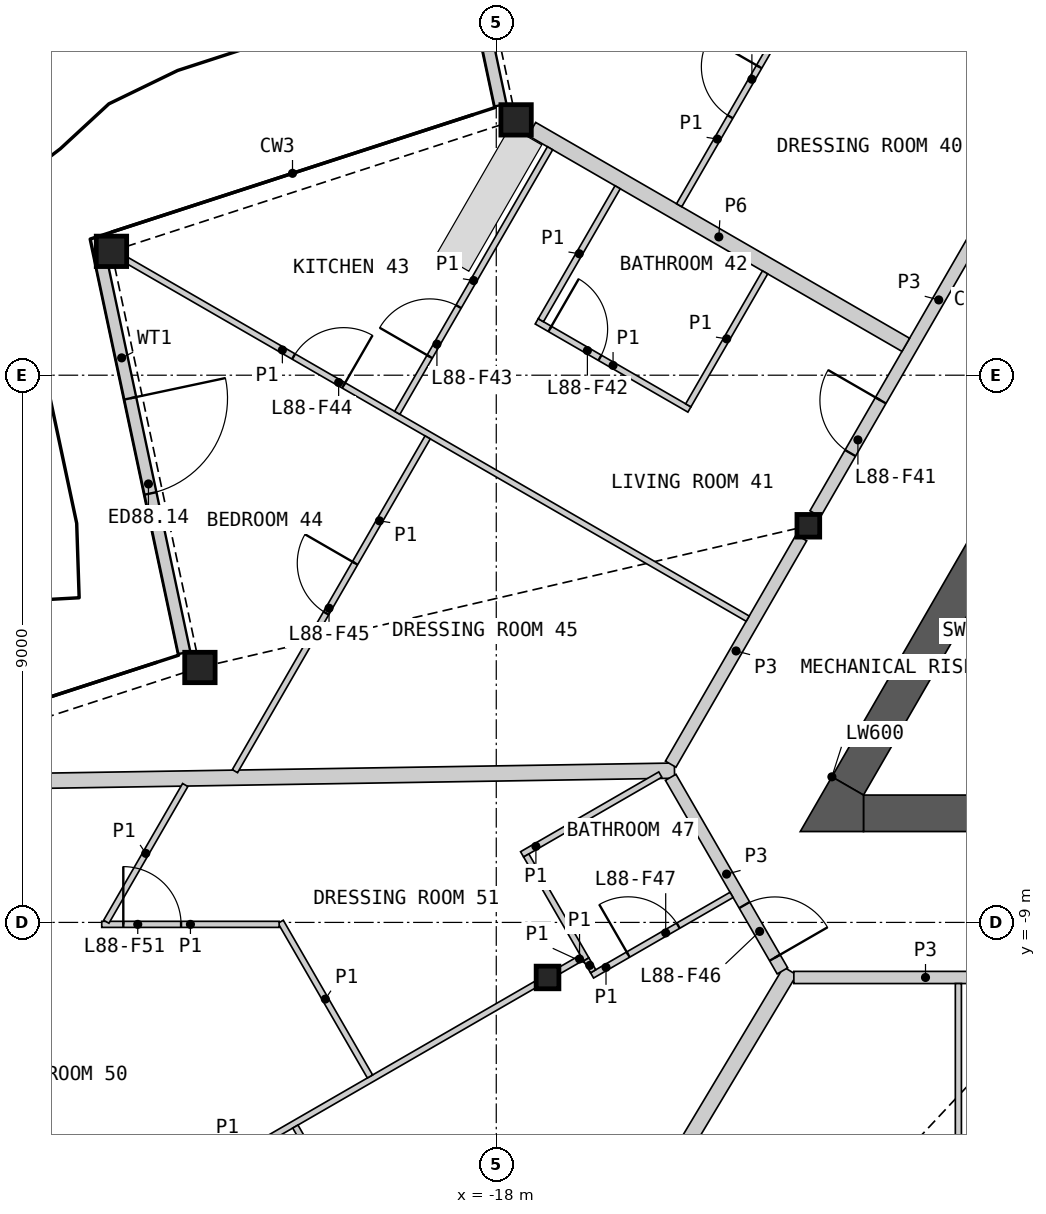
"""IFC4 building model, lengths in metres.
Left out: names, types, materials, properties, quantities, classifications, styles, units other than length and angle.
Written with IfcOpenShell. Run it as: python <this file> out.ifc"""

import sys

from ifc_helpers import new_model, si_unit, direction, frame, frame_2d, origin, origin_2d, place, context, subcontext, project, spatial, polyline, rectangle, hollow_rectangle, i_section, outline, extrude, element, fill, save


model = new_model("IFC4")
c1 = context("Model", 3, precision=1e-05, world=origin(), true_north=direction((0.0, 1.0)))
c2 = subcontext(c1, "Body", "Model", "MODEL_VIEW")
j1 = project(units=[si_unit("LENGTHUNIT", "METRE"), si_unit("PLANEANGLEUNIT", "RADIAN")], contexts=[c1])
p1 = place(None, origin())
s1 = spatial("IfcSite", under=j1, at=p1, CompositionType="ELEMENT")
p2 = place(p1, origin())
s2 = spatial("IfcBuilding", under=s1, at=p2, CompositionType="ELEMENT")
p3 = place(p2, frame((0.0, 0.0, 388.2)))
s3 = spatial("IfcBuildingStorey", under=s2, at=p3, CompositionType="ELEMENT", Elevation=388.2)
for number, where, z_axis, x_axis in (
    (1, (-17.674, 4.199, 0.0), (0.0, 0.0, 1.0), (1.0, 0.0, 0.0)),
    (2, (-24.329, 2.037, 0.0), (0.0, 0.0, 1.0), (1.0, 0.0, 0.0)),
    (3, (-22.874, -4.807, 0.0), (0.0, 0.0, 1.0), (1.0, 0.0, 0.0)),
):
    element("IfcColumn", number, at=place(p3, frame(where, z_axis=z_axis, x_axis=x_axis)), inside=s3, PredefinedType="COLUMN", context=c2, shape_type="SweptSolid", body=[
        extrude(hollow_rectangle(XDim=0.5, YDim=0.5, WallThickness=0.03, at=origin_2d()), origin(), (0.0, 0.0, 1.0), 3.4),
    ])
for number, where, z_axis, x_axis in (
    (4, (-12.868, -2.476, 0.0), (0.0, 0.0, 1.0), (1.0, 0.0, 0.0)),
    (5, (-17.157, -9.906, 0.0), (0.0, 0.0, 1.0), (1.0, 0.0, 0.0)),
):
    element("IfcColumn", number, at=place(p3, frame(where, z_axis=z_axis, x_axis=x_axis)), inside=s3, PredefinedType="COLUMN", context=c2, shape_type="SweptSolid", body=[
        extrude(i_section(OverallWidth=0.374, OverallDepth=0.372, WebThickness=0.016, FlangeThickness=0.026, at=origin_2d()), origin(), (0.0, 0.0, 1.0), 3.4),
    ])
p4 = place(p3, frame((-19.304, 10.909, 0.0), z_axis=(0.0, 0.0, 1.0), x_axis=(0.207882161022, -0.97815387702, 0.0)))
e6 = element("IfcWall", 6, at=p4, inside=s3, PredefinedType="SOLIDWALL", context=c2, shape_type="SweptSolid", body=[
    extrude(rectangle(XDim=6.612, YDim=0.2, at=frame_2d((3.306, 0.0))), origin(), (0.0, 0.0, 1.0), 2.634),
])
p5 = place(p4, frame((2.333, 0.0, 0.0)))
e7 = element("IfcOpeningElement", 7, at=p5, cuts=e6, PredefinedType="OPENING", context=c2, shape_type="SweptSolid", body=[
    extrude(rectangle(XDim=1.6, YDim=2.25, at=frame_2d((0.8, 1.125))), frame((0.0, 0.11, 0.0), z_axis=(0.0, -1.0, 0.0), x_axis=(1.0, 0.0, 0.0)), (0.0, 0.0, 1.0), 0.22),
])
p6 = place(p3, frame((-24.505, 1.902, 0.0), z_axis=(0.0, 0.0, 1.0), x_axis=(0.207917488951, -0.978146368285, 0.0)))
e8 = element("IfcWall", 8, at=p6, inside=s3, PredefinedType="SOLIDWALL", context=c2, shape_type="SweptSolid", body=[
    extrude(rectangle(XDim=6.612, YDim=0.2, at=frame_2d((3.306, 0.0))), origin(), (0.0, 0.0, 1.0), 2.634),
])
p7 = place(p6, frame((2.333, 0.0, 0.0)))
e9 = element("IfcOpeningElement", 9, at=p7, cuts=e8, PredefinedType="OPENING", context=c2, shape_type="SweptSolid", body=[
    extrude(rectangle(XDim=1.6, YDim=2.25, at=frame_2d((0.8, 1.125))), frame((0.0, 0.11, 0.0), z_axis=(0.0, -1.0, 0.0), x_axis=(1.0, 0.0, 0.0)), (0.0, 0.0, 1.0), 0.22),
])
p8 = place(p3, origin())
e10 = element("IfcWall", 10, at=p8, inside=s3, PredefinedType="SHEAR", context=c2, shape_type="SweptSolid", body=[
    extrude(outline(polyline([(-5.307, -1.281), (-10.374, -4.206), (-10.032, -4.298), (-5.182, -1.498), (-5.307, -1.281)])), origin(), (0.0, 0.0, 1.0), 3.1),
])
p9 = place(p3, origin())
e11 = element("IfcWall", 11, at=p9, inside=s3, PredefinedType="SHEAR", context=c2, shape_type="SweptSolid", body=[
    extrude(outline(polyline([(-10.374, -4.206), (-8.83, -6.881), (-8.738, -6.539), (-10.032, -4.298), (-10.374, -4.206)])), origin(), (0.0, 0.0, 1.0), 3.1),
])
p10 = place(p3, frame((-11.961, -7.206, 0.0), z_axis=(0.0, 0.0, 1.0), x_axis=(1.0, 0.0, 0.0)))
e12 = element("IfcWall", 12, at=p10, inside=s3, PredefinedType="SHEAR", context=c2, shape_type="SweptSolid", body=[
    extrude(rectangle(XDim=4.868, YDim=0.6, at=frame_2d((2.434, 0.0))), origin(), (0.0, 0.0, 1.0), 3.1),
])
p11 = place(p3, frame((-9.562, -2.15, 0.0), z_axis=(0.0, 0.0, 1.0), x_axis=(-0.500015214976, -0.866016619236, 0.0)))
e13 = element("IfcWall", 13, at=p11, inside=s3, PredefinedType="SHEAR", context=c2, shape_type="SweptSolid", body=[
    extrude(rectangle(XDim=5.318, YDim=0.6, at=frame_2d((2.659, 0.0))), origin(), (0.0, 0.0, 1.0), 3.1),
])
p12 = place(p3, origin())
e14 = element("IfcWall", 14, at=p12, inside=s3, PredefinedType="SHEAR", context=c2, shape_type="SweptSolid", body=[
    extrude(outline(polyline([(-12.48, -6.606), (-11.961, -6.906), (-11.961, -7.506), (-13.0, -7.506), (-12.48, -6.606)])), origin(), (0.0, 0.0, 1.0), 3.1),
])
p13 = place(p3, frame((-20.338, -21.771, 0.0), z_axis=(0.0, 0.0, 1.0), x_axis=(0.513878217441, 0.857863146218, 0.0)))
e15 = element("IfcWall", 15, at=p13, inside=s3, PredefinedType="PARTITIONING", context=c2, shape_type="SweptSolid", body=[
    extrude(rectangle(XDim=13.956, YDim=0.25, at=frame_2d((6.978, 0.0))), origin(), (0.0, 0.0, 1.0), 2.33),
])
p14 = place(p3, frame((-29.269, -6.732, 0.0), z_axis=(0.0, 0.0, 1.0), x_axis=(0.999870533117, 0.016090898164, 0.0)))
e16 = element("IfcWall", 16, at=p14, inside=s3, PredefinedType="PARTITIONING", context=c2, shape_type="SweptSolid", body=[
    extrude(rectangle(XDim=14.202, YDim=0.25, at=frame_2d((7.101, 0.0))), origin(), (0.0, 0.0, 1.0), 2.33),
])
p15 = place(p3, frame((-12.754, -2.279, 0.0), z_axis=(0.0, 0.0, 1.0), x_axis=(0.500001682468, 0.866024432409, 0.0)))
e17 = element("IfcWall", 17, at=p15, inside=s3, PredefinedType="PARTITIONING", context=c2, shape_type="SweptSolid", body=[
    extrude(rectangle(XDim=8.124, YDim=0.2, at=frame_2d((4.062, 0.0))), origin(), (0.0, 0.0, 1.0), 3.1),
])
p16 = place(p15, frame((1.153, 0.0, 0.0)))
e18 = element("IfcOpeningElement", 18, at=p16, cuts=e17, PredefinedType="OPENING", context=c2, shape_type="SweptSolid", body=[
    extrude(rectangle(XDim=1.0, YDim=2.1, at=frame_2d((0.5, 1.05))), frame((0.0, 0.11, 0.0), z_axis=(0.0, -1.0, 0.0), x_axis=(1.0, 0.0, 0.0)), (0.0, 0.0, 1.0), 0.22),
])
p17 = place(p3, frame((-17.414, 4.049, 0.0), z_axis=(0.0, 0.0, 1.0), x_axis=(0.866033839264, -0.499985389037, 0.0)))
e19 = element("IfcWall", 19, at=p17, inside=s3, PredefinedType="PARTITIONING", context=c2, shape_type="SweptSolid", body=[
    extrude(rectangle(XDim=7.1, YDim=0.25, at=frame_2d((3.55, 0.0))), origin(), (0.0, 0.0, 1.0), 2.33),
])
p18 = place(p3, frame((-13.106, -9.906, 0.0), z_axis=(0.0, 0.0, 1.0), x_axis=(1.0, 0.0, 0.0)))
e20 = element("IfcWall", 20, at=p18, inside=s3, PredefinedType="PARTITIONING", context=c2, shape_type="SweptSolid", body=[
    extrude(rectangle(XDim=4.331, YDim=0.2, at=frame_2d((2.165, 0.0))), origin(), (0.0, 0.0, 1.0), 3.1),
])
p19 = place(p3, frame((-15.131, -6.397, 0.0), z_axis=(0.0, 0.0, 1.0), x_axis=(0.499986217557, 0.866033360935, 0.0)))
e21 = element("IfcWall", 21, at=p19, inside=s3, PredefinedType="PARTITIONING", context=c2, shape_type="SweptSolid", body=[
    extrude(rectangle(XDim=4.3, YDim=0.2, at=frame_2d((2.15, 0.0))), origin(), (0.0, 0.0, 1.0), 3.1),
])
p20 = place(p3, frame((-15.131, -6.614, 0.0), z_axis=(0.0, 0.0, 1.0), x_axis=(0.499967746641, -0.866044024469, 0.0)))
e22 = element("IfcWall", 22, at=p20, inside=s3, PredefinedType="PARTITIONING", context=c2, shape_type="SweptSolid", body=[
    extrude(rectangle(XDim=3.676, YDim=0.2, at=frame_2d((1.838, 0.0))), origin(), (0.0, 0.0, 1.0), 3.1),
])
p21 = place(p20, frame((2.426, 0.0, 0.0)))
e23 = element("IfcOpeningElement", 23, at=p21, cuts=e22, PredefinedType="OPENING", context=c2, shape_type="SweptSolid", body=[
    extrude(rectangle(XDim=1.0, YDim=2.1, at=frame_2d((0.5, 1.05))), frame((0.0, 0.11, 0.0), z_axis=(0.0, -1.0, 0.0), x_axis=(1.0, 0.0, 0.0)), (0.0, 0.0, 1.0), 0.22),
])
p22 = place(p3, frame((-10.4, -21.828, 0.0), z_axis=(0.0, 0.0, 1.0), x_axis=(0.0, 1.0, 0.0)))
e24 = element("IfcWall", 24, at=p22, inside=s3, PredefinedType="PARTITIONING", context=c2, shape_type="SweptSolid", body=[
    extrude(rectangle(XDim=11.822, YDim=0.1, at=frame_2d((5.911, 0.0))), origin(), (0.0, 0.0, 1.0), 2.33),
])
p23 = place(p22, frame((1.156, 0.0, 0.0)))
e25 = element("IfcOpeningElement", 25, at=p23, cuts=e24, PredefinedType="OPENING", context=c2, shape_type="SweptSolid", body=[
    extrude(rectangle(XDim=0.95, YDim=2.1, at=frame_2d((0.475, 1.05))), frame((0.0, 0.06, 0.0), z_axis=(0.0, -1.0, 0.0), x_axis=(1.0, 0.0, 0.0)), (0.0, 0.0, 1.0), 0.12),
])
p24 = place(p3, frame((-24.069, 1.887, 0.0), z_axis=(0.0, 0.0, 1.0), x_axis=(0.866023404247, -0.500003463284, 0.0)))
e26 = element("IfcWall", 26, at=p24, inside=s3, PredefinedType="PARTITIONING", context=c2, shape_type="SweptSolid", body=[
    extrude(rectangle(XDim=11.782, YDim=0.1, at=frame_2d((5.891, 0.0))), origin(), (0.0, 0.0, 1.0), 2.33),
])
p25 = place(p24, frame((3.159, 0.0, 0.0)))
e27 = element("IfcOpeningElement", 27, at=p25, cuts=e26, PredefinedType="OPENING", context=c2, shape_type="SweptSolid", body=[
    extrude(rectangle(XDim=0.95, YDim=2.1, at=frame_2d((0.475, 1.05))), frame((0.0, 0.06, 0.0), z_axis=(0.0, -1.0, 0.0), x_axis=(1.0, 0.0, 0.0)), (0.0, 0.0, 1.0), 0.12),
])
p26 = place(p3, frame((-18.869, 10.894, 0.0), z_axis=(0.0, 0.0, 1.0), x_axis=(0.866023724155, -0.500002909193, 0.0)))
e28 = element("IfcWall", 28, at=p26, inside=s3, PredefinedType="PARTITIONING", context=c2, shape_type="SweptSolid", body=[
    extrude(rectangle(XDim=11.655, YDim=0.1, at=frame_2d((5.827, 0.0))), origin(), (0.0, 0.0, 1.0), 2.33),
])
p27 = place(p26, frame((6.253, 0.0, 0.0)))
e29 = element("IfcOpeningElement", 29, at=p27, cuts=e28, PredefinedType="OPENING", context=c2, shape_type="SweptSolid", body=[
    extrude(rectangle(XDim=0.95, YDim=2.1, at=frame_2d((0.475, 1.05))), frame((0.0, 0.06, 0.0), z_axis=(0.0, -1.0, 0.0), x_axis=(1.0, 0.0, 0.0)), (0.0, 0.0, 1.0), 0.12),
])
p28 = place(p3, frame((-26.777, -15.46, 0.0), z_axis=(0.0, 0.0, 1.0), x_axis=(0.866019680922, 0.500009912158, 0.0)))
e30 = element("IfcWall", 30, at=p28, inside=s3, PredefinedType="PARTITIONING", context=c2, shape_type="SweptSolid", body=[
    extrude(rectangle(XDim=10.881, YDim=0.1, at=frame_2d((5.44, 0.0))), origin(), (0.0, 0.0, 1.0), 2.33),
])
p29 = place(p28, frame((1.454, 0.0, 0.0)))
e31 = element("IfcOpeningElement", 31, at=p29, cuts=e30, PredefinedType="OPENING", context=c2, shape_type="SweptSolid", body=[
    extrude(rectangle(XDim=0.95, YDim=2.1, at=frame_2d((0.475, 1.05))), frame((0.0, 0.06, 0.0), z_axis=(0.0, -1.0, 0.0), x_axis=(1.0, 0.0, 0.0)), (0.0, 0.0, 1.0), 0.12),
])
p30 = place(p3, frame((-21.304, -12.358, 0.0), z_axis=(0.0, 0.0, 1.0), x_axis=(0.500000558108, -0.866025081561, 0.0)))
e32 = element("IfcWall", 32, at=p30, inside=s3, PredefinedType="PARTITIONING", context=c2, shape_type="SweptSolid", body=[
    extrude(rectangle(XDim=6.358, YDim=0.1, at=frame_2d((3.179, 0.0))), origin(), (0.0, 0.0, 1.0), 2.33),
])
p31 = place(p30, frame((3.555, 0.0, 0.0)))
e33 = element("IfcOpeningElement", 33, at=p31, cuts=e32, PredefinedType="OPENING", context=c2, shape_type="SweptSolid", body=[
    extrude(rectangle(XDim=0.95, YDim=2.1, at=frame_2d((0.475, 1.05))), frame((0.0, 0.06, 0.0), z_axis=(0.0, -1.0, 0.0), x_axis=(1.0, 0.0, 0.0)), (0.0, 0.0, 1.0), 0.12),
])
p32 = place(p3, frame((-22.298, -6.512, 0.0), z_axis=(0.0, 0.0, 1.0), x_axis=(0.499991387631, 0.866030376081, 0.0)))
e34 = element("IfcWall", 34, at=p32, inside=s3, PredefinedType="PARTITIONING", context=c2, shape_type="SweptSolid", body=[
    extrude(rectangle(XDim=6.339, YDim=0.1, at=frame_2d((3.169, 0.0))), origin(), (0.0, 0.0, 1.0), 2.33),
])
p33 = place(p32, frame((3.0, 0.0, 0.0)))
e35 = element("IfcOpeningElement", 35, at=p33, cuts=e34, PredefinedType="OPENING", context=c2, shape_type="SweptSolid", body=[
    extrude(rectangle(XDim=0.95, YDim=2.1, at=frame_2d((0.475, 1.05))), frame((0.0, 0.06, 0.0), z_axis=(0.0, -1.0, 0.0), x_axis=(1.0, 0.0, 0.0)), (0.0, 0.0, 1.0), 0.12),
])
p34 = place(p3, frame((-19.628, -0.619, 0.0), z_axis=(0.0, 0.0, 1.0), x_axis=(0.499990214365, 0.86603105345, 0.0)))
e36 = element("IfcWall", 36, at=p34, inside=s3, PredefinedType="PARTITIONING", context=c2, shape_type="SweptSolid", body=[
    extrude(rectangle(XDim=5.025, YDim=0.1, at=frame_2d((2.512, 0.0))), origin(), (0.0, 0.0, 1.0), 2.33),
])
p35 = place(p34, frame((1.067, 0.0, 0.0)))
e37 = element("IfcOpeningElement", 37, at=p35, cuts=e36, PredefinedType="OPENING", context=c2, shape_type="SweptSolid", body=[
    extrude(rectangle(XDim=0.95, YDim=2.1, at=frame_2d((0.475, 1.05))), frame((0.0, 0.06, 0.0), z_axis=(0.0, -1.0, 0.0), x_axis=(1.0, 0.0, 0.0)), (0.0, 0.0, 1.0), 0.12),
])
p36 = place(p3, frame((-14.992, 2.796, 0.0), z_axis=(0.0, 0.0, 1.0), x_axis=(0.499990214365, 0.86603105345, 0.0)))
e38 = element("IfcWall", 38, at=p36, inside=s3, PredefinedType="PARTITIONING", context=c2, shape_type="SweptSolid", body=[
    extrude(rectangle(XDim=5.025, YDim=0.1, at=frame_2d((2.512, 0.0))), origin(), (0.0, 0.0, 1.0), 2.33),
])
p37 = place(p36, frame((1.68, 0.0, 0.0)))
e39 = element("IfcOpeningElement", 39, at=p37, cuts=e38, PredefinedType="OPENING", context=c2, shape_type="SweptSolid", body=[
    extrude(rectangle(XDim=0.95, YDim=2.1, at=frame_2d((0.475, 1.05))), frame((0.0, 0.06, 0.0), z_axis=(0.0, -1.0, 0.0), x_axis=(1.0, 0.0, 0.0)), (0.0, 0.0, 1.0), 0.12),
])
p38 = place(p3, frame((-21.546, -8.989, 0.0), z_axis=(0.0, 0.0, 1.0), x_axis=(0.499919039967, -0.866072141036, 0.0)))
e40 = element("IfcWall", 40, at=p38, inside=s3, PredefinedType="PARTITIONING", context=c2, shape_type="SweptSolid", body=[
    extrude(rectangle(XDim=2.938, YDim=0.1, at=frame_2d((1.469, 0.0))), origin(), (0.0, 0.0, 1.0), 2.33),
])
p39 = place(p3, frame((-24.489, -9.032, 0.0), z_axis=(0.0, 0.0, 1.0), x_axis=(1.0, 0.0, 0.0)))
e41 = element("IfcWall", 41, at=p39, inside=s3, PredefinedType="PARTITIONING", context=c2, shape_type="SweptSolid", body=[
    extrude(rectangle(XDim=2.917, YDim=0.1, at=frame_2d((1.459, 0.0))), origin(), (0.0, 0.0, 1.0), 2.33),
])
p40 = place(p39, frame((0.355, 0.0, 0.0)))
e42 = element("IfcOpeningElement", 42, at=p40, cuts=e41, PredefinedType="OPENING", context=c2, shape_type="SweptSolid", body=[
    extrude(rectangle(XDim=0.95, YDim=2.1, at=frame_2d((0.475, 1.05))), frame((0.0, 0.06, 0.0), z_axis=(0.0, -1.0, 0.0), x_axis=(1.0, 0.0, 0.0)), (0.0, 0.0, 1.0), 0.12),
])
p41 = place(p3, frame((-17.335, 0.886, 0.0), z_axis=(0.0, 0.0, 1.0), x_axis=(0.866032775405, -0.499987231761, 0.0)))
e43 = element("IfcWall", 43, at=p41, inside=s3, PredefinedType="PARTITIONING", context=c2, shape_type="SweptSolid", body=[
    extrude(rectangle(XDim=2.9, YDim=0.1, at=frame_2d((1.45, 0.0))), origin(), (0.0, 0.0, 1.0), 2.33),
])
p42 = place(p41, frame((0.25, 0.0, 0.0)))
e44 = element("IfcOpeningElement", 44, at=p42, cuts=e43, PredefinedType="OPENING", context=c2, shape_type="SweptSolid", body=[
    extrude(rectangle(XDim=0.95, YDim=2.1, at=frame_2d((0.475, 1.05))), frame((0.0, 0.06, 0.0), z_axis=(0.0, -1.0, 0.0), x_axis=(1.0, 0.0, 0.0)), (0.0, 0.0, 1.0), 0.12),
])
p43 = place(p3, frame((-24.414, -8.989, 0.0), z_axis=(0.0, 0.0, 1.0), x_axis=(0.500042595688, 0.866000809756, 0.0)))
e45 = element("IfcWall", 45, at=p43, inside=s3, PredefinedType="PARTITIONING", context=c2, shape_type="SweptSolid", body=[
    extrude(rectangle(XDim=2.596, YDim=0.1, at=frame_2d((1.298, 0.0))), origin(), (0.0, 0.0, 1.0), 2.33),
])
p44 = place(p3, frame((-17.575, -7.881, 0.0), z_axis=(0.0, 0.0, 1.0), x_axis=(0.866036909293, 0.499980071345, 0.0)))
e46 = element("IfcWall", 46, at=p44, inside=s3, PredefinedType="PARTITIONING", context=c2, shape_type="SweptSolid", body=[
    extrude(rectangle(XDim=2.625, YDim=0.1, at=frame_2d((1.312, 0.0))), origin(), (0.0, 0.0, 1.0), 2.33),
])
p45 = place(p3, frame((-17.267, 0.905, 0.0), z_axis=(0.0, 0.0, 1.0), x_axis=(0.499976333282, 0.866039067339, 0.0)))
e47 = element("IfcWall", 47, at=p45, inside=s3, PredefinedType="PARTITIONING", context=c2, shape_type="SweptSolid", body=[
    extrude(rectangle(XDim=2.525, YDim=0.1, at=frame_2d((1.262, 0.0))), origin(), (0.0, 0.0, 1.0), 2.33),
])
p46 = place(p3, frame((-14.842, -0.496, 0.0), z_axis=(0.0, 0.0, 1.0), x_axis=(0.500048846702, 0.865997200291, 0.0)))
e48 = element("IfcWall", 48, at=p46, inside=s3, PredefinedType="PARTITIONING", context=c2, shape_type="SweptSolid", body=[
    extrude(rectangle(XDim=2.525, YDim=0.1, at=frame_2d((1.263, 0.0))), origin(), (0.0, 0.0, 1.0), 2.33),
])
p47 = place(p3, frame((-16.425, -9.872, 0.0), z_axis=(0.0, 0.0, 1.0), x_axis=(0.86603978909, 0.499975083092, 0.0)))
e49 = element("IfcWall", 49, at=p47, inside=s3, PredefinedType="PARTITIONING", context=c2, shape_type="SweptSolid", body=[
    extrude(rectangle(XDim=2.649, YDim=0.1, at=frame_2d((1.325, 0.0))), origin(), (0.0, 0.0, 1.0), 2.33),
])
p48 = place(p47, frame((0.686, 0.0, 0.0)))
e50 = element("IfcOpeningElement", 50, at=p48, cuts=e49, PredefinedType="OPENING", context=c2, shape_type="SweptSolid", body=[
    extrude(rectangle(XDim=0.95, YDim=2.1, at=frame_2d((0.475, 1.05))), frame((0.0, 0.06, 0.0), z_axis=(0.0, -1.0, 0.0), x_axis=(1.0, 0.0, 0.0)), (0.0, 0.0, 1.0), 0.12),
])
p49 = place(p3, frame((-17.507, -7.899, 0.0), z_axis=(0.0, 0.0, 1.0), x_axis=(0.500011643316, -0.866018681408, 0.0)))
e51 = element("IfcWall", 51, at=p49, inside=s3, PredefinedType="PARTITIONING", context=c2, shape_type="SweptSolid", body=[
    extrude(rectangle(XDim=1.973, YDim=0.1, at=frame_2d((0.987, 0.0))), origin(), (0.0, 0.0, 1.0), 2.33),
])
p50 = place(p3, frame((-16.96, -9.792, 0.0), z_axis=(0.0, 0.0, 1.0), x_axis=(0.866137484628, 0.499805820016, 0.0)))
e52 = element("IfcWall", 52, at=p50, inside=s3, PredefinedType="PARTITIONING", context=c2, shape_type="SweptSolid", body=[
    extrude(rectangle(XDim=0.423, YDim=0.1, at=frame_2d((0.211, 0.0))), origin(), (0.0, 0.0, 1.0), 2.33),
])
p51 = place(p3, frame((-16.519, -9.61, 0.0), z_axis=(0.0, 0.0, 1.0), x_axis=(0.50245032488, -0.864606078528, 0.0)))
e53 = element("IfcWall", 53, at=p51, inside=s3, PredefinedType="PARTITIONING", context=c2, shape_type="SweptSolid", body=[
    extrude(rectangle(XDim=0.224, YDim=0.1, at=frame_2d((0.112, 0.0))), origin(), (0.0, 0.0, 1.0), 2.33),
])
p52 = place(p7, origin())
e54 = element("IfcDoor", 54, at=p52, inside=s3, OperationType="DOUBLE_DOOR_SINGLE_SWING", PredefinedType="DOOR", context=c2, shape_type="SweptSolid", body=[
    extrude(rectangle(XDim=1.6, YDim=2.25, at=frame_2d((0.8, 1.125))), frame((0.0, 0.025, 0.0), z_axis=(0.0, -1.0, 0.0), x_axis=(1.0, 0.0, 0.0)), (0.0, 0.0, 1.0), 0.05),
])
fill(e9, e54)
p53 = place(p37, origin())
e55 = element("IfcDoor", 55, at=p53, inside=s3, OperationType="SINGLE_SWING_RIGHT", PredefinedType="DOOR", context=c2, shape_type="SweptSolid", body=[
    extrude(rectangle(XDim=0.95, YDim=2.1, at=frame_2d((0.475, 1.05))), frame((0.0, 0.025, 0.0), z_axis=(0.0, -1.0, 0.0), x_axis=(1.0, 0.0, 0.0)), (0.0, 0.0, 1.0), 0.05),
])
fill(e39, e55)
p54 = place(p16, origin())
e56 = element("IfcDoor", 56, at=p54, inside=s3, OperationType="SINGLE_SWING_RIGHT", PredefinedType="DOOR", context=c2, shape_type="SweptSolid", body=[
    extrude(rectangle(XDim=1.0, YDim=2.1, at=frame_2d((0.5, 1.05))), frame((0.0, 0.025, 0.0), z_axis=(0.0, -1.0, 0.0), x_axis=(1.0, 0.0, 0.0)), (0.0, 0.0, 1.0), 0.05),
])
fill(e18, e56)
p55 = place(p42, origin())
e57 = element("IfcDoor", 57, at=p55, inside=s3, OperationType="SINGLE_SWING_LEFT", PredefinedType="DOOR", context=c2, shape_type="SweptSolid", body=[
    extrude(rectangle(XDim=0.95, YDim=2.1, at=frame_2d((0.475, 1.05))), frame((0.0, 0.025, 0.0), z_axis=(0.0, -1.0, 0.0), x_axis=(1.0, 0.0, 0.0)), (0.0, 0.0, 1.0), 0.05),
])
fill(e44, e57)
p56 = place(p35, origin())
e58 = element("IfcDoor", 58, at=p56, inside=s3, OperationType="SINGLE_SWING_LEFT", PredefinedType="DOOR", context=c2, shape_type="SweptSolid", body=[
    extrude(rectangle(XDim=0.95, YDim=2.1, at=frame_2d((0.475, 1.05))), frame((0.0, 0.025, 0.0), z_axis=(0.0, -1.0, 0.0), x_axis=(1.0, 0.0, 0.0)), (0.0, 0.0, 1.0), 0.05),
])
fill(e37, e58)
p57 = place(p25, origin())
e59 = element("IfcDoor", 59, at=p57, inside=s3, OperationType="SINGLE_SWING_RIGHT", PredefinedType="DOOR", context=c2, shape_type="SweptSolid", body=[
    extrude(rectangle(XDim=0.95, YDim=2.1, at=frame_2d((0.475, 1.05))), frame((0.0, 0.025, 0.0), z_axis=(0.0, -1.0, 0.0), x_axis=(1.0, 0.0, 0.0)), (0.0, 0.0, 1.0), 0.05),
])
fill(e27, e59)
p58 = place(p33, origin())
e60 = element("IfcDoor", 60, at=p58, inside=s3, OperationType="SINGLE_SWING_RIGHT", PredefinedType="DOOR", context=c2, shape_type="SweptSolid", body=[
    extrude(rectangle(XDim=0.95, YDim=2.1, at=frame_2d((0.475, 1.05))), frame((0.0, 0.025, 0.0), z_axis=(0.0, -1.0, 0.0), x_axis=(1.0, 0.0, 0.0)), (0.0, 0.0, 1.0), 0.05),
])
fill(e35, e60)
p59 = place(p21, origin())
e61 = element("IfcDoor", 61, at=p59, inside=s3, OperationType="SINGLE_SWING_RIGHT", PredefinedType="DOOR", context=c2, shape_type="SweptSolid", body=[
    extrude(rectangle(XDim=1.0, YDim=2.1, at=frame_2d((0.5, 1.05))), frame((0.0, 0.025, 0.0), z_axis=(0.0, -1.0, 0.0), x_axis=(1.0, 0.0, 0.0)), (0.0, 0.0, 1.0), 0.05),
])
fill(e23, e61)
p60 = place(p48, origin())
e62 = element("IfcDoor", 62, at=p60, inside=s3, OperationType="SINGLE_SWING_LEFT", PredefinedType="DOOR", context=c2, shape_type="SweptSolid", body=[
    extrude(rectangle(XDim=0.95, YDim=2.1, at=frame_2d((0.475, 1.05))), frame((0.0, 0.025, 0.0), z_axis=(0.0, -1.0, 0.0), x_axis=(1.0, 0.0, 0.0)), (0.0, 0.0, 1.0), 0.05),
])
fill(e50, e62)
p61 = place(p40, origin())
e63 = element("IfcDoor", 63, at=p61, inside=s3, OperationType="SINGLE_SWING_LEFT", PredefinedType="DOOR", context=c2, shape_type="SweptSolid", body=[
    extrude(rectangle(XDim=0.95, YDim=2.1, at=frame_2d((0.475, 1.05))), frame((0.0, 0.025, 0.0), z_axis=(0.0, -1.0, 0.0), x_axis=(1.0, 0.0, 0.0)), (0.0, 0.0, 1.0), 0.05),
])
fill(e42, e63)
save(model, sys.argv[1])
